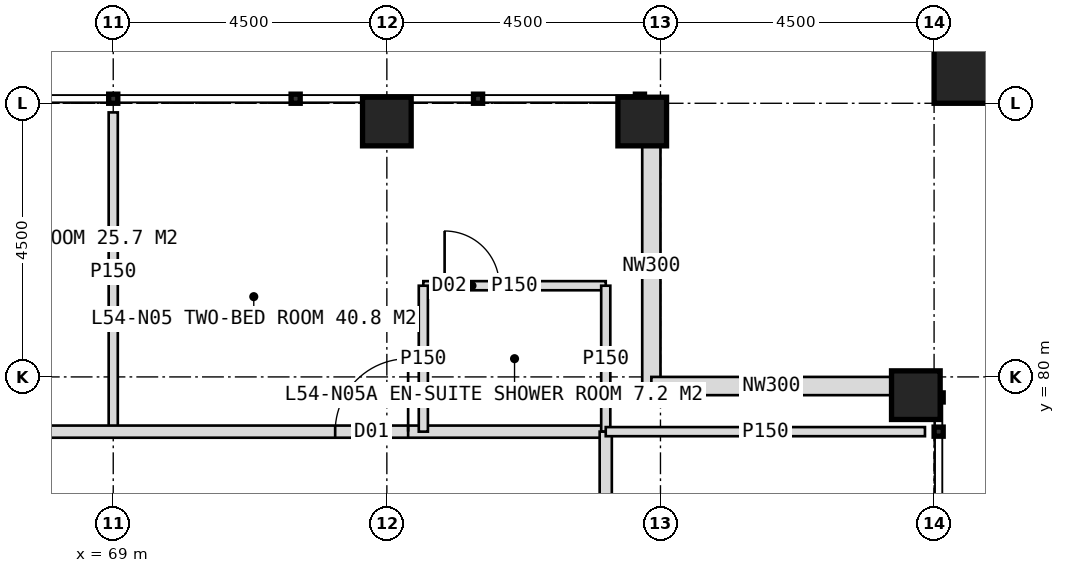
"""IFC4 building model, lengths in metres.
Left out: names, types, materials, properties, quantities, classifications, styles, units other than length and angle.
Written with IfcOpenShell. Run it as: python <this file> out.ifc"""

import sys

from ifc_helpers import new_model, si_unit, direction, frame, frame_2d, origin, origin_2d, place, context, subcontext, project, spatial, rectangle, hollow_rectangle, extrude, element, fill, save


model = new_model("IFC4")
c1 = context("Model", 3, precision=1e-05, world=origin(), true_north=direction((0.0, 1.0)))
c2 = subcontext(c1, "Body", "Model", "MODEL_VIEW")
j1 = project(units=[si_unit("LENGTHUNIT", "METRE"), si_unit("PLANEANGLEUNIT", "RADIAN")], contexts=[c1])
p1 = place(None, origin())
s1 = spatial("IfcSite", under=j1, at=p1, CompositionType="ELEMENT")
p2 = place(p1, origin())
s2 = spatial("IfcBuilding", under=s1, at=p2, CompositionType="ELEMENT")
p3 = place(p2, frame((0.0, 0.0, 225.0)))
s3 = spatial("IfcBuildingStorey", under=s2, at=p3, CompositionType="ELEMENT", Elevation=225.0)
for number, where, z_axis, x_axis in (
    (1, (73.5, 84.2, 0.0), (0.0, 0.0, 1.0), (1.0, 0.0, 0.0)),
    (2, (77.7, 84.2, 0.0), (0.0, 0.0, 1.0), (1.0, 0.0, 0.0)),
    (3, (82.2, 79.7, 0.0), (0.0, 0.0, 1.0), (1.0, 0.0, 0.0)),
):
    element("IfcColumn", number, at=place(p3, frame(where, z_axis=z_axis, x_axis=x_axis)), inside=s3, PredefinedType="COLUMN", context=c2, shape_type="SweptSolid", body=[
        extrude(hollow_rectangle(XDim=0.8, YDim=0.8, WallThickness=0.08, at=origin_2d()), origin(), (0.0, 0.0, 1.0), 4.0),
    ])
p4 = place(p3, frame((83.1, 85.1, 0.0), z_axis=(0.0, 0.0, 1.0), x_axis=(1.0, 0.0, 0.0)))
e4 = element("IfcColumn", 4, at=p4, inside=s3, PredefinedType="COLUMN", context=c2, shape_type="SweptSolid", body=[
    extrude(hollow_rectangle(XDim=1.2, YDim=1.2, WallThickness=0.07, at=origin_2d()), origin(), (0.0, 0.0, 1.0), 4.0),
])
for number, where, z_axis, x_axis in (
    (5, (77.85, 83.8, 0.0), (0.0, 0.0, 1.0), (0.0, -1.0, 0.0)),
    (6, (77.85, 79.85, 0.0), (0.0, 0.0, 1.0), (1.0, 0.0, 0.0)),
):
    element("IfcWall", number, at=place(p3, frame(where, z_axis=z_axis, x_axis=x_axis)), inside=s3, PredefinedType="ELEMENTEDWALL", context=c2, shape_type="SweptSolid", body=[
        extrude(rectangle(XDim=3.95, YDim=0.3, at=frame_2d((1.975, 0.0))), origin(), (0.0, 0.0, 1.0), 2.85),
    ])
p5 = place(p3, frame((69.0, 79.1, 0.0), z_axis=(0.0, 0.0, 1.0), x_axis=(0.0, 1.0, 0.0)))
e7 = element("IfcWall", 7, at=p5, inside=s3, PredefinedType="PARTITIONING", context=c2, shape_type="SweptSolid", body=[
    extrude(rectangle(XDim=5.25, YDim=0.15, at=frame_2d((2.625, 0.0))), origin(), (0.0, 0.0, 1.0), 3.75),
])
p6 = place(p3, frame((42.9, 79.1, 0.0), z_axis=(0.0, 0.0, 1.0), x_axis=(1.0, 0.0, 0.0)))
e8 = element("IfcWall", 8, at=p6, inside=s3, PredefinedType="PARTITIONING", context=c2, shape_type="SweptSolid", body=[
    extrude(rectangle(XDim=34.2, YDim=0.2, at=frame_2d((17.1, 0.0))), origin(), (0.0, 0.0, 1.0), 3.75),
])
p7 = place(p6, frame((3.55, 0.0, 0.0)))
e9 = element("IfcOpeningElement", 9, at=p7, cuts=e8, PredefinedType="OPENING", context=c2, shape_type="SweptSolid", body=[
    extrude(rectangle(XDim=1.0, YDim=2.1, at=frame_2d((0.5, 1.05))), frame((0.0, 0.11, 0.0), z_axis=(0.0, -1.0, 0.0), x_axis=(1.0, 0.0, 0.0)), (0.0, 0.0, 1.0), 0.22),
])
p8 = place(p6, frame((10.75, 0.0, 0.0)))
e10 = element("IfcOpeningElement", 10, at=p8, cuts=e8, PredefinedType="OPENING", context=c2, shape_type="SweptSolid", body=[
    extrude(rectangle(XDim=1.2, YDim=2.2, at=frame_2d((0.6, 1.1))), frame((0.0, 0.11, 0.0), z_axis=(0.0, -1.0, 0.0), x_axis=(1.0, 0.0, 0.0)), (0.0, 0.0, 1.0), 0.22),
])
p9 = place(p6, frame((16.25, 0.0, 0.0)))
e11 = element("IfcOpeningElement", 11, at=p9, cuts=e8, PredefinedType="OPENING", context=c2, shape_type="SweptSolid", body=[
    extrude(rectangle(XDim=1.2, YDim=2.2, at=frame_2d((0.6, 1.1))), frame((0.0, 0.11, 0.0), z_axis=(0.0, -1.0, 0.0), x_axis=(1.0, 0.0, 0.0)), (0.0, 0.0, 1.0), 0.22),
])
p10 = place(p6, frame((22.75, 0.0, 0.0)))
e12 = element("IfcOpeningElement", 12, at=p10, cuts=e8, PredefinedType="OPENING", context=c2, shape_type="SweptSolid", body=[
    extrude(rectangle(XDim=1.2, YDim=2.2, at=frame_2d((0.6, 1.1))), frame((0.0, 0.11, 0.0), z_axis=(0.0, -1.0, 0.0), x_axis=(1.0, 0.0, 0.0)), (0.0, 0.0, 1.0), 0.22),
])
p11 = place(p6, frame((29.75, 0.0, 0.0)))
e13 = element("IfcOpeningElement", 13, at=p11, cuts=e8, PredefinedType="OPENING", context=c2, shape_type="SweptSolid", body=[
    extrude(rectangle(XDim=1.2, YDim=2.2, at=frame_2d((0.6, 1.1))), frame((0.0, 0.11, 0.0), z_axis=(0.0, -1.0, 0.0), x_axis=(1.0, 0.0, 0.0)), (0.0, 0.0, 1.0), 0.22),
])
p12 = place(p3, frame((74.1, 81.5, 0.0), z_axis=(0.0, 0.0, 1.0), x_axis=(1.0, 0.0, 0.0)))
e14 = element("IfcWall", 14, at=p12, inside=s3, PredefinedType="PARTITIONING", context=c2, shape_type="SweptSolid", body=[
    extrude(rectangle(XDim=3.0, YDim=0.15, at=frame_2d((1.5, 0.0))), origin(), (0.0, 0.0, 1.0), 3.75),
])
p13 = place(p12, frame((0.35, 0.0, 0.0)))
e15 = element("IfcOpeningElement", 15, at=p13, cuts=e14, PredefinedType="OPENING", context=c2, shape_type="SweptSolid", body=[
    extrude(rectangle(XDim=0.9, YDim=2.1, at=frame_2d((0.45, 1.05))), frame((0.0, 0.085, 0.0), z_axis=(0.0, -1.0, 0.0), x_axis=(1.0, 0.0, 0.0)), (0.0, 0.0, 1.0), 0.17),
])
for number, where, z_axis, x_axis in (
    (16, (74.1, 79.1, 0.0), (0.0, 0.0, 1.0), (0.0, 1.0, 0.0)),
    (17, (77.1, 79.1, 0.0), (0.0, 0.0, 1.0), (0.0, 1.0, 0.0)),
):
    element("IfcWall", number, at=place(p3, frame(where, z_axis=z_axis, x_axis=x_axis)), inside=s3, PredefinedType="PARTITIONING", context=c2, shape_type="SweptSolid", body=[
        extrude(rectangle(XDim=2.4, YDim=0.15, at=frame_2d((1.2, 0.0))), origin(), (0.0, 0.0, 1.0), 3.75),
    ])
p14 = place(p3, frame((77.1, 79.1, 0.0), z_axis=(0.0, 0.0, 1.0), x_axis=(0.0, -1.0, 0.0)))
e18 = element("IfcWall", 18, at=p14, inside=s3, PredefinedType="PARTITIONING", context=c2, shape_type="SweptSolid", body=[
    extrude(rectangle(XDim=34.2, YDim=0.2, at=frame_2d((17.1, 0.0))), origin(), (0.0, 0.0, 1.0), 3.75),
])
p15 = place(p14, frame((3.65, 0.0, 0.0)))
e19 = element("IfcOpeningElement", 19, at=p15, cuts=e18, PredefinedType="OPENING", context=c2, shape_type="SweptSolid", body=[
    extrude(rectangle(XDim=1.2, YDim=2.2, at=frame_2d((0.6, 1.1))), frame((0.0, 0.11, 0.0), z_axis=(0.0, -1.0, 0.0), x_axis=(1.0, 0.0, 0.0)), (0.0, 0.0, 1.0), 0.22),
])
p16 = place(p14, frame((10.75, 0.0, 0.0)))
e20 = element("IfcOpeningElement", 20, at=p16, cuts=e18, PredefinedType="OPENING", context=c2, shape_type="SweptSolid", body=[
    extrude(rectangle(XDim=1.2, YDim=2.2, at=frame_2d((0.6, 1.1))), frame((0.0, 0.11, 0.0), z_axis=(0.0, -1.0, 0.0), x_axis=(1.0, 0.0, 0.0)), (0.0, 0.0, 1.0), 0.22),
])
p17 = place(p14, frame((15.1, 0.0, 0.0)))
e21 = element("IfcOpeningElement", 21, at=p17, cuts=e18, PredefinedType="OPENING", context=c2, shape_type="SweptSolid", body=[
    extrude(rectangle(XDim=1.0, YDim=2.1, at=frame_2d((0.5, 1.05))), frame((0.0, 0.11, 0.0), z_axis=(0.0, -1.0, 0.0), x_axis=(1.0, 0.0, 0.0)), (0.0, 0.0, 1.0), 0.22),
])
p18 = place(p14, frame((19.75, 0.0, 0.0)))
e22 = element("IfcOpeningElement", 22, at=p18, cuts=e18, PredefinedType="OPENING", context=c2, shape_type="SweptSolid", body=[
    extrude(rectangle(XDim=1.2, YDim=2.2, at=frame_2d((0.6, 1.1))), frame((0.0, 0.11, 0.0), z_axis=(0.0, -1.0, 0.0), x_axis=(1.0, 0.0, 0.0)), (0.0, 0.0, 1.0), 0.22),
])
p19 = place(p14, frame((30.35, 0.0, 0.0)))
e23 = element("IfcOpeningElement", 23, at=p19, cuts=e18, PredefinedType="OPENING", context=c2, shape_type="SweptSolid", body=[
    extrude(rectangle(XDim=1.2, YDim=2.2, at=frame_2d((0.6, 1.1))), frame((0.0, 0.11, 0.0), z_axis=(0.0, -1.0, 0.0), x_axis=(1.0, 0.0, 0.0)), (0.0, 0.0, 1.0), 0.22),
])
p20 = place(p3, frame((77.1, 79.1, 0.0), z_axis=(0.0, 0.0, 1.0), x_axis=(1.0, 0.0, 0.0)))
e24 = element("IfcWall", 24, at=p20, inside=s3, PredefinedType="PARTITIONING", context=c2, shape_type="SweptSolid", body=[
    extrude(rectangle(XDim=5.25, YDim=0.15, at=frame_2d((2.625, 0.0))), origin(), (0.0, 0.0, 1.0), 3.75),
])
p21 = place(p11, origin())
e25 = element("IfcDoor", 25, at=p21, inside=s3, OperationType="SINGLE_SWING_RIGHT", PredefinedType="DOOR", context=c2, shape_type="SweptSolid", body=[
    extrude(rectangle(XDim=1.2, YDim=2.2, at=frame_2d((0.6, 1.1))), frame((0.0, 0.025, 0.0), z_axis=(0.0, -1.0, 0.0), x_axis=(1.0, 0.0, 0.0)), (0.0, 0.0, 1.0), 0.05),
])
fill(e13, e25)
p22 = place(p13, origin())
e26 = element("IfcDoor", 26, at=p22, inside=s3, OperationType="SINGLE_SWING_LEFT", PredefinedType="DOOR", context=c2, shape_type="SweptSolid", body=[
    extrude(rectangle(XDim=0.9, YDim=2.1, at=frame_2d((0.45, 1.05))), frame((0.0, 0.025, 0.0), z_axis=(0.0, -1.0, 0.0), x_axis=(1.0, 0.0, 0.0)), (0.0, 0.0, 1.0), 0.05),
])
fill(e15, e26)
save(model, sys.argv[1])
